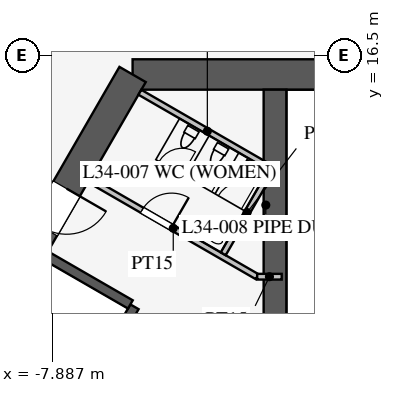
"""IFC4 building model, lengths in metres.
Left out: names, types, materials, properties, quantities, classifications, styles, units other than length and angle.
Written with IfcOpenShell. Run it as: python <this file> out.ifc"""

import sys

from ifc_helpers import new_model, si_unit, direction, frame, frame_2d, origin, place, context, subcontext, project, spatial, rectangle, extrude, element, fill, save


model = new_model("IFC4")
c1 = context("Model", 3, precision=1e-05, world=origin(), true_north=direction((0.0, 1.0)))
c2 = subcontext(c1, "Body", "Model", "MODEL_VIEW")
j1 = project(units=[si_unit("LENGTHUNIT", "METRE"), si_unit("PLANEANGLEUNIT", "RADIAN")], contexts=[c1])
p1 = place(None, origin())
s1 = spatial("IfcSite", under=j1, at=p1, CompositionType="ELEMENT")
p2 = place(p1, origin())
s2 = spatial("IfcBuilding", under=s1, at=p2, CompositionType="ELEMENT")
p3 = place(p2, frame((0.0, 0.0, 149.3)))
s3 = spatial("IfcBuildingStorey", under=s2, at=p3, CompositionType="ELEMENT", Elevation=149.3)
p4 = place(p3, frame((5.773, 16.0, 0.0), z_axis=(0.0, 0.0, 1.0), x_axis=(-1.0, 0.0, 0.0)))
e1 = element("IfcWall", 1, at=p4, inside=s3, PredefinedType="SHEAR", context=c2, shape_type="SweptSolid", body=[
    extrude(rectangle(XDim=11.547, YDim=0.8, at=frame_2d((5.773, 0.0))), origin(), (0.0, 0.0, 1.0), 4.2),
])
p5 = place(p3, frame((-5.773, 16.0, 0.0), z_axis=(0.0, 0.0, 1.0), x_axis=(-0.500002442456, -0.866023993627, 0.0)))
e2 = element("IfcWall", 2, at=p5, inside=s3, PredefinedType="SHEAR", context=c2, shape_type="SweptSolid", body=[
    extrude(rectangle(XDim=21.939, YDim=0.8, at=frame_2d((10.97, 0.0))), origin(), (0.0, 0.0, 1.0), 4.2),
])
p6 = place(p5, frame((17.27, 0.0, 0.0)))
e3 = element("IfcOpeningElement", 3, at=p6, cuts=e2, PredefinedType="OPENING", context=c2, shape_type="SweptSolid", body=[
    extrude(rectangle(XDim=1.2, YDim=2.1, at=frame_2d((0.6, 1.05))), frame((0.0, 0.41, 0.0), z_axis=(0.0, -1.0, 0.0), x_axis=(1.0, 0.0, 0.0)), (0.0, 0.0, 1.0), 0.82),
])
p7 = place(p5, frame((3.47, 0.0, 0.0)))
e4 = element("IfcOpeningElement", 4, at=p7, cuts=e2, PredefinedType="OPENING", context=c2, shape_type="SweptSolid", body=[
    extrude(rectangle(XDim=1.2, YDim=2.1, at=frame_2d((0.6, 1.05))), frame((0.0, 0.41, 0.0), z_axis=(0.0, -1.0, 0.0), x_axis=(1.0, 0.0, 0.0)), (0.0, 0.0, 1.0), 0.82),
])
p8 = place(p3, frame((-5.724, 9.886, 0.0), z_axis=(0.0, 0.0, 1.0), x_axis=(-0.500001763848, -0.866024385424, 0.0)))
e5 = element("IfcWall", 5, at=p8, inside=s3, PredefinedType="SHEAR", context=c2, shape_type="SweptSolid", body=[
    extrude(rectangle(XDim=11.4, YDim=0.25, at=frame_2d((5.7, 0.0))), origin(), (0.0, 0.0, 1.0), 4.2),
])
p9 = place(p8, frame((6.525, 0.0, 0.0)))
e6 = element("IfcOpeningElement", 6, at=p9, cuts=e5, PredefinedType="OPENING", context=c2, shape_type="SweptSolid", body=[
    extrude(rectangle(XDim=1.2, YDim=2.2, at=frame_2d((0.6, 1.1))), frame((0.0, 0.135, 0.0), z_axis=(0.0, -1.0, 0.0), x_axis=(1.0, 0.0, 0.0)), (0.0, 0.0, 1.0), 0.27),
])
p10 = place(p8, frame((9.375, 0.0, 0.0)))
e7 = element("IfcOpeningElement", 7, at=p10, cuts=e5, PredefinedType="OPENING", context=c2, shape_type="SweptSolid", body=[
    extrude(rectangle(XDim=1.2, YDim=2.2, at=frame_2d((0.6, 1.1))), frame((0.0, 0.135, 0.0), z_axis=(0.0, -1.0, 0.0), x_axis=(1.0, 0.0, 0.0)), (0.0, 0.0, 1.0), 0.27),
])
p11 = place(p3, frame((-5.832, 9.949, 0.0), z_axis=(0.0, 0.0, 1.0), x_axis=(-0.866029291668, 0.499993265928, 0.0)))
e8 = element("IfcWall", 8, at=p11, inside=s3, PredefinedType="SHEAR", context=c2, shape_type="SweptSolid", body=[
    extrude(rectangle(XDim=2.575, YDim=0.25, at=frame_2d((1.288, 0.0))), origin(), (0.0, 0.0, 1.0), 4.2),
])
p12 = place(p3, frame((-2.025, 6.525, 0.0), z_axis=(0.0, 0.0, 1.0), x_axis=(0.0, 1.0, 0.0)))
e9 = element("IfcWall", 9, at=p12, inside=s3, PredefinedType="SHEAR", context=c2, shape_type="SweptSolid", body=[
    extrude(rectangle(XDim=9.075, YDim=0.6, at=frame_2d((4.538, 0.0))), origin(), (0.0, 0.0, 1.0), 4.2),
])
p13 = place(p3, frame((-2.495, 10.678, 0.0), z_axis=(0.0, 0.0, 1.0), x_axis=(-0.86602216432, 0.500005610874, 0.0)))
e10 = element("IfcWall", 10, at=p13, inside=s3, PredefinedType="PARTITIONING", context=c2, shape_type="SweptSolid", body=[
    extrude(rectangle(XDim=5.1, YDim=0.15, at=frame_2d((2.55, 0.0))), origin(), (0.0, 0.0, 1.0), 4.0),
])
p14 = place(p13, frame((2.6, 0.0, 0.0)))
e11 = element("IfcOpeningElement", 11, at=p14, cuts=e10, PredefinedType="OPENING", context=c2, shape_type="SweptSolid", body=[
    extrude(rectangle(XDim=0.9, YDim=2.1, at=frame_2d((0.45, 1.05))), frame((0.0, 0.085, 0.0), z_axis=(0.0, -1.0, 0.0), x_axis=(1.0, 0.0, 0.0)), (0.0, 0.0, 1.0), 0.17),
])
p15 = place(p3, frame((-2.495, 10.678, 0.0), z_axis=(0.0, 0.0, 1.0), x_axis=(1.0, 0.0, 0.0)))
e12 = element("IfcWall", 12, at=p15, inside=s3, PredefinedType="PARTITIONING", context=c2, shape_type="SweptSolid", body=[
    extrude(rectangle(XDim=0.645, YDim=0.15, at=frame_2d((0.323, 0.0))), origin(), (0.0, 0.0, 1.0), 4.0),
])
p16 = place(p3, frame((-2.031, 13.482, 0.0), z_axis=(0.0, 0.0, 1.0), x_axis=(-0.866050731258, 0.499956128963, 0.0)))
e13 = element("IfcWall", 13, at=p16, inside=s3, PredefinedType="PARTITIONING", context=c2, shape_type="SweptSolid", body=[
    extrude(rectangle(XDim=4.1, YDim=0.15, at=frame_2d((2.05, 0.0))), origin(), (0.0, 0.0, 1.0), 4.0),
])
p17 = place(p3, frame((-3.389, 11.281, 0.0), z_axis=(0.0, 0.0, 1.0), x_axis=(0.499989096993, 0.866031698547, 0.0)))
e14 = element("IfcWall", 14, at=p17, inside=s3, PredefinedType="PARTITIONING", context=c2, shape_type="SweptSolid", body=[
    extrude(rectangle(XDim=2.51, YDim=0.15, at=frame_2d((1.255, 0.0))), origin(), (0.0, 0.0, 1.0), 4.0),
])
p18 = place(p3, frame((-0.016, 30.491, 0.0), z_axis=(0.0, 0.0, 1.0), x_axis=(-0.50000091641, -0.866024874695, 0.0)))
e15 = element("IfcWall", 15, at=p18, inside=s3, PredefinedType="PARTITIONING", context=c2, shape_type="SweptSolid", body=[
    extrude(rectangle(XDim=52.796, YDim=0.12, at=frame_2d((26.398, 0.0))), origin(), (0.0, 0.0, 1.0), 2.9),
])
p19 = place(p18, frame((10.2, 0.0, 0.15)))
e16 = element("IfcOpeningElement", 16, at=p19, cuts=e15, PredefinedType="OPENING", context=c2, shape_type="SweptSolid", body=[
    extrude(rectangle(XDim=1.8, YDim=2.1, at=frame_2d((0.9, 1.05))), frame((0.0, 0.07, 0.0), z_axis=(0.0, -1.0, 0.0), x_axis=(1.0, 0.0, 0.0)), (0.0, 0.0, 1.0), 0.14),
])
p20 = place(p18, frame((40.8, 0.0, 0.15)))
e17 = element("IfcOpeningElement", 17, at=p20, cuts=e15, PredefinedType="OPENING", context=c2, shape_type="SweptSolid", body=[
    extrude(rectangle(XDim=1.8, YDim=2.1, at=frame_2d((0.9, 1.05))), frame((0.0, 0.07, 0.0), z_axis=(0.0, -1.0, 0.0), x_axis=(1.0, 0.0, 0.0)), (0.0, 0.0, 1.0), 0.14),
])
p21 = place(p14, frame((0.9, 0.0, 0.0), z_axis=(0.0, 0.0, 1.0), x_axis=(-1.0, 0.0, 0.0)))
e18 = element("IfcDoor", 18, at=p21, inside=s3, OperationType="SINGLE_SWING_RIGHT", PredefinedType="DOOR", context=c2, shape_type="SweptSolid", body=[
    extrude(rectangle(XDim=0.9, YDim=2.1, at=frame_2d((0.45, 1.05))), frame((0.0, 0.025, 0.0), z_axis=(0.0, -1.0, 0.0), x_axis=(1.0, 0.0, 0.0)), (0.0, 0.0, 1.0), 0.05),
])
fill(e11, e18)
p22 = place(p7, origin())
e19 = element("IfcDoor", 19, at=p22, inside=s3, OperationType="SINGLE_SWING_LEFT", PredefinedType="DOOR", context=c2, shape_type="SweptSolid", body=[
    extrude(rectangle(XDim=1.2, YDim=2.1, at=frame_2d((0.6, 1.05))), frame((0.0, 0.025, 0.0), z_axis=(0.0, -1.0, 0.0), x_axis=(1.0, 0.0, 0.0)), (0.0, 0.0, 1.0), 0.05),
])
fill(e4, e19)
save(model, sys.argv[1])
